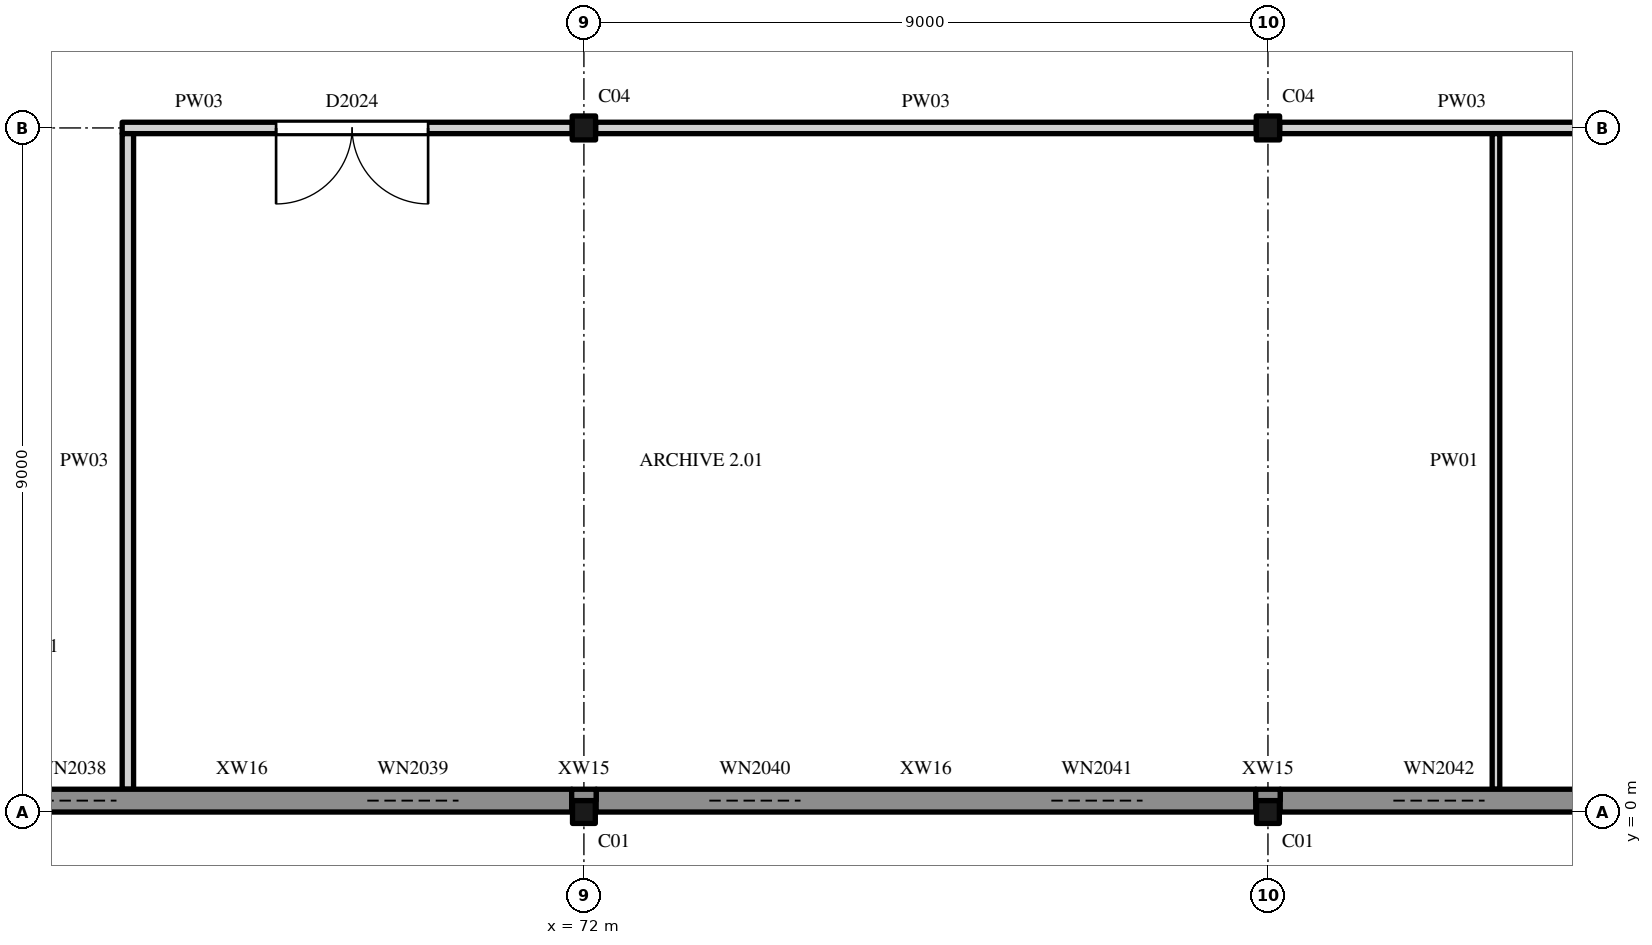
"""IFC4 building model, lengths in metres.
Left out: names, types, materials, properties, quantities, classifications, styles, units other than length and angle.
Written with IfcOpenShell. Run it as: python <this file> out.ifc"""

import sys

from ifc_helpers import new_model, si_unit, direction, frame, frame_2d, origin, origin_2d, place, context, subcontext, project, spatial, rectangle, hollow_rectangle, i_section, extrude, element, fill, save


model = new_model("IFC4")
c1 = context("Model", 3, precision=1e-05, world=origin(), true_north=direction((0.0, 1.0)))
c2 = subcontext(c1, "Body", "Model", "MODEL_VIEW")
j1 = project(units=[si_unit("LENGTHUNIT", "METRE"), si_unit("PLANEANGLEUNIT", "RADIAN")], contexts=[c1])
p1 = place(None, origin())
s1 = spatial("IfcSite", under=j1, at=p1, CompositionType="ELEMENT")
p2 = place(p1, origin())
s2 = spatial("IfcBuilding", under=s1, at=p2, CompositionType="ELEMENT")
p3 = place(p2, frame((0.0, 0.0, 11.0)))
s3 = spatial("IfcBuildingStorey", under=s2, at=p3, CompositionType="ELEMENT", Elevation=11.0)
for number, where, z_axis, x_axis in (
    (1, (72.0, 0.0, 0.0), (0.0, 0.0, 1.0), (1.0, 0.0, 0.0)),
    (2, (81.0, 0.0, 0.0), (0.0, 0.0, 1.0), (1.0, 0.0, 0.0)),
):
    element("IfcColumn", number, at=place(p3, frame(where, z_axis=z_axis, x_axis=x_axis)), inside=s3, PredefinedType="COLUMN", context=c2, shape_type="SweptSolid", body=[
        extrude(hollow_rectangle(XDim=0.3, YDim=0.3, WallThickness=0.012, InnerFilletRadius=0.019, OuterFilletRadius=0.031, at=origin_2d()), origin(), (0.0, 0.0, 1.0), 5.0),
    ])
for number, where, z_axis, x_axis in (
    (3, (72.0, 9.0, 0.0), (0.0, 0.0, 1.0), (1.0, 0.0, 0.0)),
    (4, (81.0, 9.0, 0.0), (0.0, 0.0, 1.0), (1.0, 0.0, 0.0)),
):
    element("IfcColumn", number, at=place(p3, frame(where, z_axis=z_axis, x_axis=x_axis)), inside=s3, PredefinedType="COLUMN", context=c2, shape_type="SweptSolid", body=[
        extrude(i_section(OverallWidth=0.307, OverallDepth=0.315, WebThickness=0.012, FlangeThickness=0.019, FilletRadius=0.017, at=origin_2d()), origin(), (0.0, 0.0, 1.0), 5.0),
    ])
p4 = place(p3, frame((63.172, 0.15, 0.0), z_axis=(0.0, 0.0, 1.0), x_axis=(1.0, 0.0, 0.0)))
e5 = element("IfcWall", 5, at=p4, inside=s3, PredefinedType="SOLIDWALL", context=c2, shape_type="SweptSolid", body=[
    extrude(rectangle(XDim=8.667, YDim=0.3, at=frame_2d((4.333, 0.0))), origin(), (0.0, 0.0, 1.0), 4.825),
])
p5 = place(p4, frame((1.478, 0.0, 1.2)))
e6 = element("IfcOpeningElement", 6, at=p5, cuts=e5, PredefinedType="OPENING", context=c2, shape_type="SweptSolid", body=[
    extrude(rectangle(XDim=1.2, YDim=1.5, at=frame_2d((0.6, 0.75))), frame((0.0, 0.16, 0.0), z_axis=(0.0, -1.0, 0.0), x_axis=(1.0, 0.0, 0.0)), (0.0, 0.0, 1.0), 0.32),
])
p6 = place(p4, frame((5.978, 0.0, 1.2)))
e7 = element("IfcOpeningElement", 7, at=p6, cuts=e5, PredefinedType="OPENING", context=c2, shape_type="SweptSolid", body=[
    extrude(rectangle(XDim=1.2, YDim=1.5, at=frame_2d((0.6, 0.75))), frame((0.0, 0.16, 0.0), z_axis=(0.0, -1.0, 0.0), x_axis=(1.0, 0.0, 0.0)), (0.0, 0.0, 1.0), 0.32),
])
p7 = place(p3, frame((72.161, 0.15, 0.0), z_axis=(0.0, 0.0, 1.0), x_axis=(1.0, 0.0, 0.0)))
e8 = element("IfcWall", 8, at=p7, inside=s3, PredefinedType="SOLIDWALL", context=c2, shape_type="SweptSolid", body=[
    extrude(rectangle(XDim=8.678, YDim=0.3, at=frame_2d((4.339, 0.0))), origin(), (0.0, 0.0, 1.0), 4.825),
])
p8 = place(p7, frame((1.489, 0.0, 1.2)))
e9 = element("IfcOpeningElement", 9, at=p8, cuts=e8, PredefinedType="OPENING", context=c2, shape_type="SweptSolid", body=[
    extrude(rectangle(XDim=1.2, YDim=1.5, at=frame_2d((0.6, 0.75))), frame((0.0, 0.16, 0.0), z_axis=(0.0, -1.0, 0.0), x_axis=(1.0, 0.0, 0.0)), (0.0, 0.0, 1.0), 0.32),
])
p9 = place(p7, frame((5.989, 0.0, 1.2)))
e10 = element("IfcOpeningElement", 10, at=p9, cuts=e8, PredefinedType="OPENING", context=c2, shape_type="SweptSolid", body=[
    extrude(rectangle(XDim=1.2, YDim=1.5, at=frame_2d((0.6, 0.75))), frame((0.0, 0.16, 0.0), z_axis=(0.0, -1.0, 0.0), x_axis=(1.0, 0.0, 0.0)), (0.0, 0.0, 1.0), 0.32),
])
p10 = place(p3, frame((81.161, 0.15, 0.0), z_axis=(0.0, 0.0, 1.0), x_axis=(1.0, 0.0, 0.0)))
e11 = element("IfcWall", 11, at=p10, inside=s3, PredefinedType="SOLIDWALL", context=c2, shape_type="SweptSolid", body=[
    extrude(rectangle(XDim=8.678, YDim=0.3, at=frame_2d((4.339, 0.0))), origin(), (0.0, 0.0, 1.0), 4.825),
])
p11 = place(p10, frame((1.489, 0.0, 1.2)))
e12 = element("IfcOpeningElement", 12, at=p11, cuts=e11, PredefinedType="OPENING", context=c2, shape_type="SweptSolid", body=[
    extrude(rectangle(XDim=1.2, YDim=1.5, at=frame_2d((0.6, 0.75))), frame((0.0, 0.16, 0.0), z_axis=(0.0, -1.0, 0.0), x_axis=(1.0, 0.0, 0.0)), (0.0, 0.0, 1.0), 0.32),
])
p12 = place(p10, frame((5.989, 0.0, 1.2)))
e13 = element("IfcOpeningElement", 13, at=p12, cuts=e11, PredefinedType="OPENING", context=c2, shape_type="SweptSolid", body=[
    extrude(rectangle(XDim=1.2, YDim=1.5, at=frame_2d((0.6, 0.75))), frame((0.0, 0.16, 0.0), z_axis=(0.0, -1.0, 0.0), x_axis=(1.0, 0.0, 0.0)), (0.0, 0.0, 1.0), 0.32),
])
for number, where, z_axis, x_axis in (
    (14, (71.839, 0.225, 0.0), (0.0, 0.0, 1.0), (1.0, 0.0, 0.0)),
    (15, (80.839, 0.225, 0.0), (0.0, 0.0, 1.0), (1.0, 0.0, 0.0)),
):
    element("IfcWall", number, at=place(p3, frame(where, z_axis=z_axis, x_axis=x_axis)), inside=s3, PredefinedType="SOLIDWALL", context=c2, shape_type="SweptSolid", body=[
        extrude(rectangle(XDim=0.322, YDim=0.15, at=frame_2d((0.161, 0.0))), origin(), (0.0, 0.0, 1.0), 4.825),
    ])
for number, where, z_axis, x_axis in (
    (16, (64.5, 2.325, 5.0), (0.0, 0.0, 1.0), (1.0, 0.0, 0.0)),
    (17, (64.5, 6.675, 5.0), (0.0, 0.0, 1.0), (1.0, 0.0, 0.0)),
):
    element("IfcWall", number, at=place(p3, frame(where, z_axis=z_axis, x_axis=x_axis)), inside=s3, PredefinedType="PARAPET", context=c2, shape_type="SweptSolid", body=[
        extrude(rectangle(XDim=6.0, YDim=0.15, at=frame_2d((3.0, 0.0))), origin(), (0.0, 0.0, 1.0), 0.5),
    ])
p13 = place(p3, frame((70.425, 2.4, 5.0), z_axis=(0.0, 0.0, 1.0), x_axis=(0.0, 1.0, 0.0)))
e18 = element("IfcWall", 18, at=p13, inside=s3, PredefinedType="PARAPET", context=c2, shape_type="SweptSolid", body=[
    extrude(rectangle(XDim=4.2, YDim=0.15, at=frame_2d((2.1, 0.0))), origin(), (0.0, 0.0, 1.0), 0.5),
])
for number, where, z_axis, x_axis in (
    (19, (73.5, 2.325, 5.0), (0.0, 0.0, 1.0), (1.0, 0.0, 0.0)),
    (20, (73.5, 6.675, 5.0), (0.0, 0.0, 1.0), (1.0, 0.0, 0.0)),
):
    element("IfcWall", number, at=place(p3, frame(where, z_axis=z_axis, x_axis=x_axis)), inside=s3, PredefinedType="PARAPET", context=c2, shape_type="SweptSolid", body=[
        extrude(rectangle(XDim=6.0, YDim=0.15, at=frame_2d((3.0, 0.0))), origin(), (0.0, 0.0, 1.0), 0.5),
    ])
for number, where, z_axis, x_axis in (
    (21, (73.575, 2.4, 5.0), (0.0, 0.0, 1.0), (0.0, 1.0, 0.0)),
    (22, (79.425, 2.4, 5.0), (0.0, 0.0, 1.0), (0.0, 1.0, 0.0)),
):
    element("IfcWall", number, at=place(p3, frame(where, z_axis=z_axis, x_axis=x_axis)), inside=s3, PredefinedType="PARAPET", context=c2, shape_type="SweptSolid", body=[
        extrude(rectangle(XDim=4.2, YDim=0.15, at=frame_2d((2.1, 0.0))), origin(), (0.0, 0.0, 1.0), 0.5),
    ])
for number, where, z_axis, x_axis in (
    (23, (82.5, 2.325, 5.0), (0.0, 0.0, 1.0), (1.0, 0.0, 0.0)),
    (24, (82.5, 6.675, 5.0), (0.0, 0.0, 1.0), (1.0, 0.0, 0.0)),
):
    element("IfcWall", number, at=place(p3, frame(where, z_axis=z_axis, x_axis=x_axis)), inside=s3, PredefinedType="PARAPET", context=c2, shape_type="SweptSolid", body=[
        extrude(rectangle(XDim=6.0, YDim=0.15, at=frame_2d((3.0, 0.0))), origin(), (0.0, 0.0, 1.0), 0.5),
    ])
p14 = place(p3, frame((82.575, 2.4, 5.0), z_axis=(0.0, 0.0, 1.0), x_axis=(0.0, 1.0, 0.0)))
e25 = element("IfcWall", 25, at=p14, inside=s3, PredefinedType="PARAPET", context=c2, shape_type="SweptSolid", body=[
    extrude(rectangle(XDim=4.2, YDim=0.15, at=frame_2d((2.1, 0.0))), origin(), (0.0, 0.0, 1.0), 0.5),
])
p15 = place(p3, frame((65.925, 9.0, 0.0), z_axis=(0.0, 0.0, 1.0), x_axis=(1.0, 0.0, 0.0)))
e26 = element("IfcWall", 26, at=p15, inside=s3, PredefinedType="PARTITIONING", context=c2, shape_type="SweptSolid", body=[
    extrude(rectangle(XDim=5.921, YDim=0.15, at=frame_2d((2.961, 0.0))), origin(), (0.0, 0.0, 1.0), 4.419),
])
p16 = place(p15, frame((2.025, 0.0, 0.0)))
e27 = element("IfcOpeningElement", 27, at=p16, cuts=e26, PredefinedType="OPENING", context=c2, shape_type="SweptSolid", body=[
    extrude(rectangle(XDim=2.0, YDim=2.4, at=frame_2d((1.0, 1.2))), frame((0.0, 0.085, 0.0), z_axis=(0.0, -1.0, 0.0), x_axis=(1.0, 0.0, 0.0)), (0.0, 0.0, 1.0), 0.17),
])
p17 = place(p3, frame((72.154, 9.0, 0.0), z_axis=(0.0, 0.0, 1.0), x_axis=(1.0, 0.0, 0.0)))
e28 = element("IfcWall", 28, at=p17, inside=s3, PredefinedType="PARTITIONING", context=c2, shape_type="SweptSolid", body=[
    extrude(rectangle(XDim=8.693, YDim=0.15, at=frame_2d((4.346, 0.0))), origin(), (0.0, 0.0, 1.0), 4.419),
])
p18 = place(p3, frame((81.154, 9.0, 0.0), z_axis=(0.0, 0.0, 1.0), x_axis=(1.0, 0.0, 0.0)))
e29 = element("IfcWall", 29, at=p18, inside=s3, PredefinedType="PARTITIONING", context=c2, shape_type="SweptSolid", body=[
    extrude(rectangle(XDim=8.693, YDim=0.15, at=frame_2d((4.346, 0.0))), origin(), (0.0, 0.0, 1.0), 4.419),
])
p19 = place(p18, frame((4.796, 0.0, 0.0)))
e30 = element("IfcOpeningElement", 30, at=p19, cuts=e29, PredefinedType="OPENING", context=c2, shape_type="SweptSolid", body=[
    extrude(rectangle(XDim=2.0, YDim=2.4, at=frame_2d((1.0, 1.2))), frame((0.0, 0.085, 0.0), z_axis=(0.0, -1.0, 0.0), x_axis=(1.0, 0.0, 0.0)), (0.0, 0.0, 1.0), 0.17),
])
p20 = place(p3, frame((66.0, 0.3, 0.0), z_axis=(0.0, 0.0, 1.0), x_axis=(0.0, 1.0, 0.0)))
e31 = element("IfcWall", 31, at=p20, inside=s3, PredefinedType="PARTITIONING", context=c2, shape_type="SweptSolid", body=[
    extrude(rectangle(XDim=8.625, YDim=0.15, at=frame_2d((4.312, 0.0))), origin(), (0.0, 0.0, 1.0), 4.825),
])
p21 = place(p3, frame((84.0, 0.3, 0.0), z_axis=(0.0, 0.0, 1.0), x_axis=(0.0, 1.0, 0.0)))
e32 = element("IfcWall", 32, at=p21, inside=s3, PredefinedType="PARTITIONING", context=c2, shape_type="SweptSolid", body=[
    extrude(rectangle(XDim=8.625, YDim=0.1, at=frame_2d((4.312, 0.0))), origin(), (0.0, 0.0, 1.0), 4.825),
])
p22 = place(p5, origin())
e33 = element("IfcWindow", 33, at=p22, inside=s3, PartitioningType="SINGLE_PANEL", PredefinedType="WINDOW", context=c2, shape_type="SweptSolid", body=[
    extrude(rectangle(XDim=1.2, YDim=1.5, at=frame_2d((0.6, 0.75))), frame((0.0, 0.03, 0.0), z_axis=(0.0, -1.0, 0.0), x_axis=(1.0, 0.0, 0.0)), (0.0, 0.0, 1.0), 0.06),
])
fill(e6, e33)
p23 = place(p6, origin())
e34 = element("IfcWindow", 34, at=p23, inside=s3, PartitioningType="SINGLE_PANEL", PredefinedType="WINDOW", context=c2, shape_type="SweptSolid", body=[
    extrude(rectangle(XDim=1.2, YDim=1.5, at=frame_2d((0.6, 0.75))), frame((0.0, 0.03, 0.0), z_axis=(0.0, -1.0, 0.0), x_axis=(1.0, 0.0, 0.0)), (0.0, 0.0, 1.0), 0.06),
])
fill(e7, e34)
p24 = place(p8, origin())
e35 = element("IfcWindow", 35, at=p24, inside=s3, PartitioningType="SINGLE_PANEL", PredefinedType="WINDOW", context=c2, shape_type="SweptSolid", body=[
    extrude(rectangle(XDim=1.2, YDim=1.5, at=frame_2d((0.6, 0.75))), frame((0.0, 0.03, 0.0), z_axis=(0.0, -1.0, 0.0), x_axis=(1.0, 0.0, 0.0)), (0.0, 0.0, 1.0), 0.06),
])
fill(e9, e35)
p25 = place(p9, origin())
e36 = element("IfcWindow", 36, at=p25, inside=s3, PartitioningType="SINGLE_PANEL", PredefinedType="WINDOW", context=c2, shape_type="SweptSolid", body=[
    extrude(rectangle(XDim=1.2, YDim=1.5, at=frame_2d((0.6, 0.75))), frame((0.0, 0.03, 0.0), z_axis=(0.0, -1.0, 0.0), x_axis=(1.0, 0.0, 0.0)), (0.0, 0.0, 1.0), 0.06),
])
fill(e10, e36)
p26 = place(p11, origin())
e37 = element("IfcWindow", 37, at=p26, inside=s3, PartitioningType="SINGLE_PANEL", PredefinedType="WINDOW", context=c2, shape_type="SweptSolid", body=[
    extrude(rectangle(XDim=1.2, YDim=1.5, at=frame_2d((0.6, 0.75))), frame((0.0, 0.03, 0.0), z_axis=(0.0, -1.0, 0.0), x_axis=(1.0, 0.0, 0.0)), (0.0, 0.0, 1.0), 0.06),
])
fill(e12, e37)
p27 = place(p16, origin())
e38 = element("IfcDoor", 38, at=p27, inside=s3, OperationType="DOUBLE_DOOR_SINGLE_SWING", PredefinedType="DOOR", context=c2, shape_type="SweptSolid", body=[
    extrude(rectangle(XDim=2.0, YDim=2.4, at=frame_2d((1.0, 1.2))), frame((0.0, 0.025, 0.0), z_axis=(0.0, -1.0, 0.0), x_axis=(1.0, 0.0, 0.0)), (0.0, 0.0, 1.0), 0.05),
])
fill(e27, e38)
save(model, sys.argv[1])
